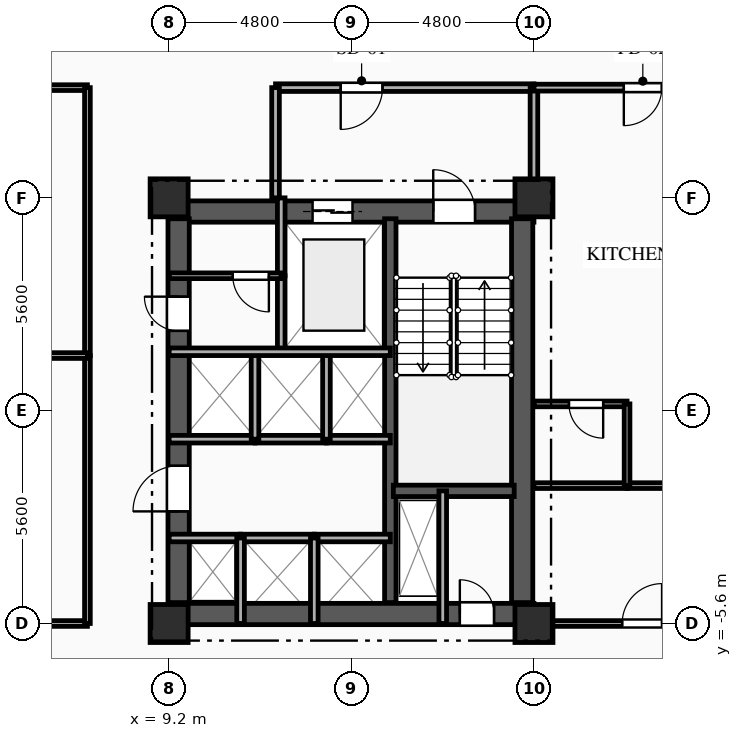
"""IFC4 building model, lengths in metres.
Left out: names, types, materials, properties, quantities, classifications, styles, units other than length and angle.
Written with IfcOpenShell. Run it as: python <this file> out.ifc"""

import sys

from ifc_helpers import new_model, si_unit, direction, frame, frame_2d, origin, origin_2d, place, context, subcontext, project, spatial, rectangle, extrude, element, fill, save


model = new_model("IFC4")
c1 = context("Model", 3, precision=1e-05, world=origin(), true_north=direction((0.0, 1.0)))
c2 = subcontext(c1, "Body", "Model", "MODEL_VIEW")
j1 = project(units=[si_unit("LENGTHUNIT", "METRE"), si_unit("PLANEANGLEUNIT", "RADIAN")], contexts=[c1])
p1 = place(None, origin())
s1 = spatial("IfcSite", under=j1, at=p1, CompositionType="ELEMENT")
p2 = place(p1, origin())
s2 = spatial("IfcBuilding", under=s1, at=p2, CompositionType="ELEMENT")
p3 = place(p2, frame((0.0, 0.0, 92.4)))
s3 = spatial("IfcBuildingStorey", under=s2, at=p3, CompositionType="ELEMENT", Elevation=92.4)
for number, where, z_axis, x_axis in (
    (1, (9.2, -5.6, 0.0), (0.0, 0.0, 1.0), (1.0, 0.0, 0.0)),
    (2, (9.2, 5.6, 0.0), (0.0, 0.0, 1.0), (1.0, 0.0, 0.0)),
    (3, (18.8, -5.6, 0.0), (0.0, 0.0, 1.0), (1.0, 0.0, 0.0)),
    (4, (18.8, 5.6, 0.0), (0.0, 0.0, 1.0), (1.0, 0.0, 0.0)),
):
    element("IfcColumn", number, at=place(p3, frame(where, z_axis=z_axis, x_axis=x_axis)), inside=s3, PredefinedType="COLUMN", context=c2, shape_type="SweptSolid", body=[
        extrude(rectangle(XDim=1.0, YDim=1.0, at=origin_2d()), origin(), (0.0, 0.0, 1.0), 3.35),
    ])
p4 = place(p3, frame((9.2, 5.24, 0.0), z_axis=(0.0, 0.0, 1.0), x_axis=(1.0, 0.0, 0.0)))
e5 = element("IfcWall", 5, at=p4, inside=s3, PredefinedType="SHEAR", context=c2, shape_type="SweptSolid", body=[
    extrude(rectangle(XDim=9.6, YDim=0.56, at=frame_2d((4.8, 0.0))), origin(), (0.0, 0.0, 1.0), 3.045),
])
p5 = place(p4, frame((6.95, 0.0, 0.0)))
e6 = element("IfcOpeningElement", 6, at=p5, cuts=e5, PredefinedType="OPENING", context=c2, shape_type="SweptSolid", body=[
    extrude(rectangle(XDim=1.1, YDim=2.15, at=frame_2d((0.55, 1.075))), frame((0.0, 0.29, 0.0), z_axis=(0.0, -1.0, 0.0), x_axis=(1.0, 0.0, 0.0)), (0.0, 0.0, 1.0), 0.58),
])
p6 = place(p4, frame((3.775, 0.0, 0.0)))
e7 = element("IfcOpeningElement", 7, at=p6, cuts=e5, PredefinedType="OPENING", context=c2, shape_type="SweptSolid", body=[
    extrude(rectangle(XDim=1.05, YDim=2.1, at=frame_2d((0.525, 1.05))), frame((0.0, 0.29, 0.0), z_axis=(0.0, -1.0, 0.0), x_axis=(1.0, 0.0, 0.0)), (0.0, 0.0, 1.0), 0.58),
])
p7 = place(p3, frame((9.2, -5.35, 0.0), z_axis=(0.0, 0.0, 1.0), x_axis=(1.0, 0.0, 0.0)))
e8 = element("IfcWall", 8, at=p7, inside=s3, PredefinedType="SHEAR", context=c2, shape_type="SweptSolid", body=[
    extrude(rectangle(XDim=9.6, YDim=0.56, at=frame_2d((4.8, 0.0))), origin(), (0.0, 0.0, 1.0), 3.045),
])
p8 = place(p7, frame((7.65, 0.0, 0.0)))
e9 = element("IfcOpeningElement", 9, at=p8, cuts=e8, PredefinedType="OPENING", context=c2, shape_type="SweptSolid", body=[
    extrude(rectangle(XDim=0.9, YDim=2.1, at=frame_2d((0.45, 1.05))), frame((0.0, 0.29, 0.0), z_axis=(0.0, -1.0, 0.0), x_axis=(1.0, 0.0, 0.0)), (0.0, 0.0, 1.0), 0.58),
])
p9 = place(p3, frame((9.45, -5.05, 0.0), z_axis=(0.0, 0.0, 1.0), x_axis=(0.0, 1.0, 0.0)))
e10 = element("IfcWall", 10, at=p9, inside=s3, PredefinedType="SHEAR", context=c2, shape_type="SweptSolid", body=[
    extrude(rectangle(XDim=10.1, YDim=0.56, at=frame_2d((5.05, 0.0))), origin(), (0.0, 0.0, 1.0), 3.045),
])
p10 = place(p9, frame((7.15, 0.0, 0.0)))
e11 = element("IfcOpeningElement", 11, at=p10, cuts=e10, PredefinedType="OPENING", context=c2, shape_type="SweptSolid", body=[
    extrude(rectangle(XDim=0.9, YDim=2.1, at=frame_2d((0.45, 1.05))), frame((0.0, 0.29, 0.0), z_axis=(0.0, -1.0, 0.0), x_axis=(1.0, 0.0, 0.0)), (0.0, 0.0, 1.0), 0.58),
])
p11 = place(p9, frame((2.4, 0.0, 0.0)))
e12 = element("IfcOpeningElement", 12, at=p11, cuts=e10, PredefinedType="OPENING", context=c2, shape_type="SweptSolid", body=[
    extrude(rectangle(XDim=1.2, YDim=2.15, at=frame_2d((0.6, 1.075))), frame((0.0, 0.29, 0.0), z_axis=(0.0, -1.0, 0.0), x_axis=(1.0, 0.0, 0.0)), (0.0, 0.0, 1.0), 0.58),
])
p12 = place(p3, frame((18.49, -5.05, 0.0), z_axis=(0.0, 0.0, 1.0), x_axis=(0.0, 1.0, 0.0)))
e13 = element("IfcWall", 13, at=p12, inside=s3, PredefinedType="SHEAR", context=c2, shape_type="SweptSolid", body=[
    extrude(rectangle(XDim=10.1, YDim=0.56, at=frame_2d((5.05, 0.0))), origin(), (0.0, 0.0, 1.0), 3.045),
])
p13 = place(p3, frame((15.02, -5.05, 0.0), z_axis=(0.0, 0.0, 1.0), x_axis=(0.0, 1.0, 0.0)))
e14 = element("IfcWall", 14, at=p13, inside=s3, PredefinedType="SHEAR", context=c2, shape_type="SweptSolid", body=[
    extrude(rectangle(XDim=10.1, YDim=0.3, at=frame_2d((5.05, 0.0))), origin(), (0.0, 0.0, 1.0), 3.045),
])
p14 = place(p3, frame((15.1, -2.11, 0.0), z_axis=(0.0, 0.0, 1.0), x_axis=(1.0, 0.0, 0.0)))
e15 = element("IfcWall", 15, at=p14, inside=s3, PredefinedType="SHEAR", context=c2, shape_type="SweptSolid", body=[
    extrude(rectangle(XDim=3.18, YDim=0.3, at=frame_2d((1.59, 0.0))), origin(), (0.0, 0.0, 1.0), 3.045),
])
p15 = place(p3, frame((16.4, -2.11, 0.0), z_axis=(0.0, 0.0, 1.0), x_axis=(0.0, -1.0, 0.0)))
e16 = element("IfcWall", 16, at=p15, inside=s3, PredefinedType="PARTITIONING", context=c2, shape_type="SweptSolid", body=[
    extrude(rectangle(XDim=3.49, YDim=0.2, at=frame_2d((1.745, 0.0))), origin(), (0.0, 0.0, 1.0), 3.045),
])
p16 = place(p3, frame((12.15, 3.55, 0.0), z_axis=(0.0, 0.0, 1.0), x_axis=(0.0, -1.0, 0.0)))
e17 = element("IfcWall", 17, at=p16, inside=s3, PredefinedType="PARTITIONING", context=c2, shape_type="SweptSolid", body=[
    extrude(rectangle(XDim=2.0, YDim=0.2, at=frame_2d((1.0, 0.0))), origin(), (0.0, 0.0, 1.0), 3.045),
])
p17 = place(p3, frame((12.15, 5.6, 0.0), z_axis=(0.0, 0.0, 1.0), x_axis=(0.0, -1.0, 0.0)))
e18 = element("IfcWall", 18, at=p17, inside=s3, PredefinedType="PARTITIONING", context=c2, shape_type="SweptSolid", body=[
    extrude(rectangle(XDim=2.05, YDim=0.2, at=frame_2d((1.025, 0.0))), origin(), (0.0, 0.0, 1.0), 3.045),
])
p18 = place(p3, frame((18.8, 8.5, 0.0), z_axis=(0.0, 0.0, 1.0), x_axis=(-1.0, 0.0, 0.0)))
e19 = element("IfcWall", 19, at=p18, inside=s3, PredefinedType="PARTITIONING", context=c2, shape_type="SweptSolid", body=[
    extrude(rectangle(XDim=6.8, YDim=0.2, at=frame_2d((3.4, 0.0))), origin(), (0.0, 0.0, 1.0), 3.045),
])
p19 = place(p18, frame((3.985, 0.0, 0.0)))
e20 = element("IfcOpeningElement", 20, at=p19, cuts=e19, PredefinedType="OPENING", context=c2, shape_type="SweptSolid", body=[
    extrude(rectangle(XDim=1.1, YDim=2.15, at=frame_2d((0.55, 1.075))), frame((0.0, 0.11, 0.0), z_axis=(0.0, -1.0, 0.0), x_axis=(1.0, 0.0, 0.0)), (0.0, 0.0, 1.0), 0.22),
])
p20 = place(p3, frame((12.0, 8.5, 0.0), z_axis=(0.0, 0.0, 1.0), x_axis=(0.0, -1.0, 0.0)))
e21 = element("IfcWall", 21, at=p20, inside=s3, PredefinedType="PARTITIONING", context=c2, shape_type="SweptSolid", body=[
    extrude(rectangle(XDim=2.9, YDim=0.2, at=frame_2d((1.45, 0.0))), origin(), (0.0, 0.0, 1.0), 3.045),
])
p21 = place(p3, frame((18.8, 5.6, 0.0), z_axis=(0.0, 0.0, 1.0), x_axis=(0.0, 1.0, 0.0)))
e22 = element("IfcWall", 22, at=p21, inside=s3, PredefinedType="PARTITIONING", context=c2, shape_type="SweptSolid", body=[
    extrude(rectangle(XDim=2.9, YDim=0.2, at=frame_2d((1.45, 0.0))), origin(), (0.0, 0.0, 1.0), 2.53),
])
p22 = place(p3, frame((12.15, 3.55, 0.0), z_axis=(0.0, 0.0, 1.0), x_axis=(-1.0, 0.0, 0.0)))
e23 = element("IfcWall", 23, at=p22, inside=s3, PredefinedType="PARTITIONING", context=c2, shape_type="SweptSolid", body=[
    extrude(rectangle(XDim=2.95, YDim=0.15, at=frame_2d((1.475, 0.0))), origin(), (0.0, 0.0, 1.0), 3.045),
])
p23 = place(p22, frame((0.325, 0.0, 0.0)))
e24 = element("IfcOpeningElement", 24, at=p23, cuts=e23, PredefinedType="OPENING", context=c2, shape_type="SweptSolid", body=[
    extrude(rectangle(XDim=0.95, YDim=2.1, at=frame_2d((0.475, 1.05))), frame((0.0, 0.085, 0.0), z_axis=(0.0, -1.0, 0.0), x_axis=(1.0, 0.0, 0.0)), (0.0, 0.0, 1.0), 0.17),
])
p24 = place(p3, frame((9.2, -3.35, 0.0), z_axis=(0.0, 0.0, 1.0), x_axis=(1.0, 0.0, 0.0)))
e25 = element("IfcWall", 25, at=p24, inside=s3, PredefinedType="PARTITIONING", context=c2, shape_type="SweptSolid", body=[
    extrude(rectangle(XDim=1.88, YDim=0.2, at=frame_2d((0.94, 0.0))), origin(), (0.0, 0.0, 1.0), 2.76),
])
p25 = place(p3, frame((11.08, -3.35, 0.0), z_axis=(0.0, 0.0, 1.0), x_axis=(1.0, 0.0, 0.0)))
e26 = element("IfcWall", 26, at=p25, inside=s3, PredefinedType="PARTITIONING", context=c2, shape_type="SweptSolid", body=[
    extrude(rectangle(XDim=1.94, YDim=0.2, at=frame_2d((0.97, 0.0))), origin(), (0.0, 0.0, 1.0), 3.045),
])
p26 = place(p3, frame((13.02, -3.35, 0.0), z_axis=(0.0, 0.0, 1.0), x_axis=(1.0, 0.0, 0.0)))
e27 = element("IfcWall", 27, at=p26, inside=s3, PredefinedType="PARTITIONING", context=c2, shape_type="SweptSolid", body=[
    extrude(rectangle(XDim=2.0, YDim=0.2, at=frame_2d((1.0, 0.0))), origin(), (0.0, 0.0, 1.0), 3.045),
])
p27 = place(p3, frame((11.46, -0.75, 0.0), z_axis=(0.0, 0.0, 1.0), x_axis=(-1.0, 0.0, 0.0)))
e28 = element("IfcWall", 28, at=p27, inside=s3, PredefinedType="PARTITIONING", context=c2, shape_type="SweptSolid", body=[
    extrude(rectangle(XDim=2.26, YDim=0.2, at=frame_2d((1.13, 0.0))), origin(), (0.0, 0.0, 1.0), 3.045),
])
p28 = place(p3, frame((13.34, -0.75, 0.0), z_axis=(0.0, 0.0, 1.0), x_axis=(-1.0, 0.0, 0.0)))
e29 = element("IfcWall", 29, at=p28, inside=s3, PredefinedType="PARTITIONING", context=c2, shape_type="SweptSolid", body=[
    extrude(rectangle(XDim=1.88, YDim=0.2, at=frame_2d((0.94, 0.0))), origin(), (0.0, 0.0, 1.0), 3.045),
])
p29 = place(p3, frame((15.02, -0.75, 0.0), z_axis=(0.0, 0.0, 1.0), x_axis=(-1.0, 0.0, 0.0)))
e30 = element("IfcWall", 30, at=p29, inside=s3, PredefinedType="PARTITIONING", context=c2, shape_type="SweptSolid", body=[
    extrude(rectangle(XDim=1.68, YDim=0.2, at=frame_2d((0.84, 0.0))), origin(), (0.0, 0.0, 1.0), 3.045),
])
for number, where, z_axis, x_axis in (
    (31, (11.08, -5.6, 0.0), (0.0, 0.0, 1.0), (0.0, 1.0, 0.0)),
    (32, (13.02, -5.6, 0.0), (0.0, 0.0, 1.0), (0.0, 1.0, 0.0)),
):
    element("IfcWall", number, at=place(p3, frame(where, z_axis=z_axis, x_axis=x_axis)), inside=s3, PredefinedType="PARTITIONING", context=c2, shape_type="SweptSolid", body=[
        extrude(rectangle(XDim=2.25, YDim=0.2, at=frame_2d((1.125, 0.0))), origin(), (0.0, 0.0, 1.0), 3.045),
    ])
for number, where, z_axis, x_axis in (
    (33, (11.46, -0.75, 0.0), (0.0, 0.0, 1.0), (0.0, 1.0, 0.0)),
    (34, (13.34, -0.75, 0.0), (0.0, 0.0, 1.0), (0.0, 1.0, 0.0)),
):
    element("IfcWall", number, at=place(p3, frame(where, z_axis=z_axis, x_axis=x_axis)), inside=s3, PredefinedType="PARTITIONING", context=c2, shape_type="SweptSolid", body=[
        extrude(rectangle(XDim=2.3, YDim=0.2, at=frame_2d((1.15, 0.0))), origin(), (0.0, 0.0, 1.0), 3.045),
    ])
p30 = place(p3, frame((23.0, 8.5, 0.0), z_axis=(0.0, 0.0, 1.0), x_axis=(-1.0, 0.0, 0.0)))
e35 = element("IfcWall", 35, at=p30, inside=s3, PredefinedType="PARTITIONING", context=c2, shape_type="SweptSolid", body=[
    extrude(rectangle(XDim=4.2, YDim=0.18, at=frame_2d((2.1, 0.0))), origin(), (0.0, 0.0, 1.0), 3.045),
])
p31 = place(p30, frame((0.835, 0.0, 0.0)))
e36 = element("IfcOpeningElement", 36, at=p31, cuts=e35, PredefinedType="OPENING", context=c2, shape_type="SweptSolid", body=[
    extrude(rectangle(XDim=1.0, YDim=2.15, at=frame_2d((0.5, 1.075))), frame((0.0, 0.1, 0.0), z_axis=(0.0, -1.0, 0.0), x_axis=(1.0, 0.0, 0.0)), (0.0, 0.0, 1.0), 0.2),
])
p32 = place(p3, frame((7.05, 8.5, 0.0), z_axis=(0.0, 0.0, 1.0), x_axis=(-1.0, 0.0, 0.0)))
e37 = element("IfcWall", 37, at=p32, inside=s3, PredefinedType="PARTITIONING", context=c2, shape_type="SweptSolid", body=[
    extrude(rectangle(XDim=7.05, YDim=0.15, at=frame_2d((3.525, 0.0))), origin(), (0.0, 0.0, 1.0), 3.045),
])
p33 = place(p3, frame((18.8, -5.6, 0.0), z_axis=(0.0, 0.0, 1.0), x_axis=(1.0, 0.0, 0.0)))
e38 = element("IfcWall", 38, at=p33, inside=s3, PredefinedType="PARTITIONING", context=c2, shape_type="SweptSolid", body=[
    extrude(rectangle(XDim=4.2, YDim=0.15, at=frame_2d((2.1, 0.0))), origin(), (0.0, 0.0, 1.0), 2.53),
])
p34 = place(p33, frame((2.321, 0.0, 0.0)))
e39 = element("IfcOpeningElement", 39, at=p34, cuts=e38, PredefinedType="OPENING", context=c2, shape_type="SweptSolid", body=[
    extrude(rectangle(XDim=1.05, YDim=2.15, at=frame_2d((0.525, 1.075))), frame((0.0, 0.085, 0.0), z_axis=(0.0, -1.0, 0.0), x_axis=(1.0, 0.0, 0.0)), (0.0, 0.0, 1.0), 0.17),
])
p35 = place(p3, frame((0.0, -5.6, 0.0), z_axis=(0.0, 0.0, 1.0), x_axis=(1.0, 0.0, 0.0)))
e40 = element("IfcWall", 40, at=p35, inside=s3, PredefinedType="PARTITIONING", context=c2, shape_type="SweptSolid", body=[
    extrude(rectangle(XDim=7.05, YDim=0.15, at=frame_2d((3.525, 0.0))), origin(), (0.0, 0.0, 1.0), 2.53),
])
for number, where, z_axis, x_axis in (
    (41, (7.05, -5.6, 0.0), (0.0, 0.0, 1.0), (0.0, 1.0, 0.0)),
    (42, (7.05, 1.45, 0.0), (0.0, 0.0, 1.0), (0.0, 1.0, 0.0)),
):
    element("IfcWall", number, at=place(p3, frame(where, z_axis=z_axis, x_axis=x_axis)), inside=s3, PredefinedType="PARTITIONING", context=c2, shape_type="SweptSolid", body=[
        extrude(rectangle(XDim=7.05, YDim=0.15, at=frame_2d((3.525, 0.0))), origin(), (0.0, 0.0, 1.0), 3.045),
    ])
p36 = place(p3, frame((21.25, -1.972, 0.0), z_axis=(0.0, 0.0, 1.0), x_axis=(1.0, 0.0, 0.0)))
e43 = element("IfcWall", 43, at=p36, inside=s3, PredefinedType="PARTITIONING", context=c2, shape_type="SweptSolid", body=[
    extrude(rectangle(XDim=4.586, YDim=0.15, at=frame_2d((2.293, 0.0))), origin(), (0.0, 0.0, 1.0), 3.045),
])
p37 = place(p3, frame((18.8, -1.972, 0.0), z_axis=(0.0, 0.0, 1.0), x_axis=(1.0, 0.0, 0.0)))
e44 = element("IfcWall", 44, at=p37, inside=s3, PredefinedType="PLUMBINGWALL", context=c2, shape_type="SweptSolid", body=[
    extrude(rectangle(XDim=2.45, YDim=0.15, at=frame_2d((1.225, 0.0))), origin(), (0.0, 0.0, 1.0), 2.53),
])
p38 = place(p3, frame((21.25, 0.178, 0.0), z_axis=(0.0, 0.0, 1.0), x_axis=(-1.0, 0.0, 0.0)))
e45 = element("IfcWall", 45, at=p38, inside=s3, PredefinedType="PLUMBINGWALL", context=c2, shape_type="SweptSolid", body=[
    extrude(rectangle(XDim=2.45, YDim=0.15, at=frame_2d((1.225, 0.0))), origin(), (0.0, 0.0, 1.0), 3.045),
])
p39 = place(p38, frame((0.629, 0.0, 0.0)))
e46 = element("IfcOpeningElement", 46, at=p39, cuts=e45, PredefinedType="OPENING", context=c2, shape_type="SweptSolid", body=[
    extrude(rectangle(XDim=0.9, YDim=2.1, at=frame_2d((0.45, 1.05))), frame((0.0, 0.085, 0.0), z_axis=(0.0, -1.0, 0.0), x_axis=(1.0, 0.0, 0.0)), (0.0, 0.0, 1.0), 0.17),
])
p40 = place(p3, frame((21.25, -1.972, 0.0), z_axis=(0.0, 0.0, 1.0), x_axis=(0.0, 1.0, 0.0)))
e47 = element("IfcWall", 47, at=p40, inside=s3, PredefinedType="PLUMBINGWALL", context=c2, shape_type="SweptSolid", body=[
    extrude(rectangle(XDim=2.15, YDim=0.15, at=frame_2d((1.075, 0.0))), origin(), (0.0, 0.0, 1.0), 3.045),
])
p41 = place(p3, frame((-7.05, 1.45, 0.0), z_axis=(0.0, 0.0, 1.0), x_axis=(1.0, 0.0, 0.0)))
e48 = element("IfcWall", 48, at=p41, inside=s3, PredefinedType="PARTITIONING", context=c2, shape_type="SweptSolid", body=[
    extrude(rectangle(XDim=14.1, YDim=0.15, at=frame_2d((7.05, 0.0))), origin(), (0.0, 0.0, 1.0), 3.045),
])
p42 = place(p3, frame((9.2, 1.55, 0.0), z_axis=(0.0, 0.0, 1.0), x_axis=(1.0, 0.0, 0.0)))
e49 = element("IfcWall", 49, at=p42, inside=s3, PredefinedType="PARTITIONING", context=c2, shape_type="SweptSolid", body=[
    extrude(rectangle(XDim=5.82, YDim=0.2, at=frame_2d((2.91, 0.0))), origin(), (0.0, 0.0, 1.0), 3.045),
])
p43 = place(p5, origin())
e50 = element("IfcDoor", 50, at=p43, inside=s3, OperationType="SINGLE_SWING_LEFT", PredefinedType="DOOR", context=c2, shape_type="SweptSolid", body=[
    extrude(rectangle(XDim=1.1, YDim=2.15, at=frame_2d((0.55, 1.075))), frame((0.0, 0.025, 0.0), z_axis=(0.0, -1.0, 0.0), x_axis=(1.0, 0.0, 0.0)), (0.0, 0.0, 1.0), 0.05),
])
fill(e6, e50)
p44 = place(p6, origin())
e51 = element("IfcDoor", 51, at=p44, inside=s3, OperationType="DOUBLE_DOOR_SLIDING", PredefinedType="DOOR", context=c2, shape_type="SweptSolid", body=[
    extrude(rectangle(XDim=1.05, YDim=2.1, at=frame_2d((0.525, 1.05))), frame((0.0, 0.025, 0.0), z_axis=(0.0, -1.0, 0.0), x_axis=(1.0, 0.0, 0.0)), (0.0, 0.0, 1.0), 0.05),
])
fill(e7, e51)
p45 = place(p8, origin())
e52 = element("IfcDoor", 52, at=p45, inside=s3, OperationType="SINGLE_SWING_LEFT", PredefinedType="DOOR", context=c2, shape_type="SweptSolid", body=[
    extrude(rectangle(XDim=0.9, YDim=2.1, at=frame_2d((0.45, 1.05))), frame((0.0, 0.025, 0.0), z_axis=(0.0, -1.0, 0.0), x_axis=(1.0, 0.0, 0.0)), (0.0, 0.0, 1.0), 0.05),
])
fill(e9, e52)
p46 = place(p19, origin())
e53 = element("IfcDoor", 53, at=p46, inside=s3, OperationType="SINGLE_SWING_RIGHT", PredefinedType="DOOR", context=c2, shape_type="SweptSolid", body=[
    extrude(rectangle(XDim=1.1, YDim=2.15, at=frame_2d((0.55, 1.075))), frame((0.0, 0.025, 0.0), z_axis=(0.0, -1.0, 0.0), x_axis=(1.0, 0.0, 0.0)), (0.0, 0.0, 1.0), 0.05),
])
fill(e20, e53)
p47 = place(p23, origin())
e54 = element("IfcDoor", 54, at=p47, inside=s3, OperationType="SINGLE_SWING_LEFT", PredefinedType="DOOR", context=c2, shape_type="SweptSolid", body=[
    extrude(rectangle(XDim=0.95, YDim=2.1, at=frame_2d((0.475, 1.05))), frame((0.0, 0.025, 0.0), z_axis=(0.0, -1.0, 0.0), x_axis=(1.0, 0.0, 0.0)), (0.0, 0.0, 1.0), 0.05),
])
fill(e24, e54)
p48 = place(p10, origin())
e55 = element("IfcDoor", 55, at=p48, inside=s3, OperationType="SINGLE_SWING_RIGHT", PredefinedType="DOOR", context=c2, shape_type="SweptSolid", body=[
    extrude(rectangle(XDim=0.9, YDim=2.1, at=frame_2d((0.45, 1.05))), frame((0.0, 0.025, 0.0), z_axis=(0.0, -1.0, 0.0), x_axis=(1.0, 0.0, 0.0)), (0.0, 0.0, 1.0), 0.05),
])
fill(e11, e55)
p49 = place(p11, origin())
e56 = element("IfcDoor", 56, at=p49, inside=s3, OperationType="SINGLE_SWING_LEFT", PredefinedType="DOOR", context=c2, shape_type="SweptSolid", body=[
    extrude(rectangle(XDim=1.2, YDim=2.15, at=frame_2d((0.6, 1.075))), frame((0.0, 0.025, 0.0), z_axis=(0.0, -1.0, 0.0), x_axis=(1.0, 0.0, 0.0)), (0.0, 0.0, 1.0), 0.05),
])
fill(e12, e56)
p50 = place(p31, origin())
e57 = element("IfcDoor", 57, at=p50, inside=s3, OperationType="SINGLE_SWING_RIGHT", PredefinedType="DOOR", context=c2, shape_type="SweptSolid", body=[
    extrude(rectangle(XDim=1.0, YDim=2.15, at=frame_2d((0.5, 1.075))), frame((0.0, 0.025, 0.0), z_axis=(0.0, -1.0, 0.0), x_axis=(1.0, 0.0, 0.0)), (0.0, 0.0, 1.0), 0.05),
])
fill(e36, e57)
p51 = place(p34, origin())
e58 = element("IfcDoor", 58, at=p51, inside=s3, OperationType="SINGLE_SWING_RIGHT", PredefinedType="DOOR", context=c2, shape_type="SweptSolid", body=[
    extrude(rectangle(XDim=1.05, YDim=2.15, at=frame_2d((0.525, 1.075))), frame((0.0, 0.025, 0.0), z_axis=(0.0, -1.0, 0.0), x_axis=(1.0, 0.0, 0.0)), (0.0, 0.0, 1.0), 0.05),
])
fill(e39, e58)
p52 = place(p39, origin())
e59 = element("IfcDoor", 59, at=p52, inside=s3, OperationType="SINGLE_SWING_LEFT", PredefinedType="DOOR", context=c2, shape_type="SweptSolid", body=[
    extrude(rectangle(XDim=0.9, YDim=2.1, at=frame_2d((0.45, 1.05))), frame((0.0, 0.025, 0.0), z_axis=(0.0, -1.0, 0.0), x_axis=(1.0, 0.0, 0.0)), (0.0, 0.0, 1.0), 0.05),
])
fill(e46, e59)
save(model, sys.argv[1])
